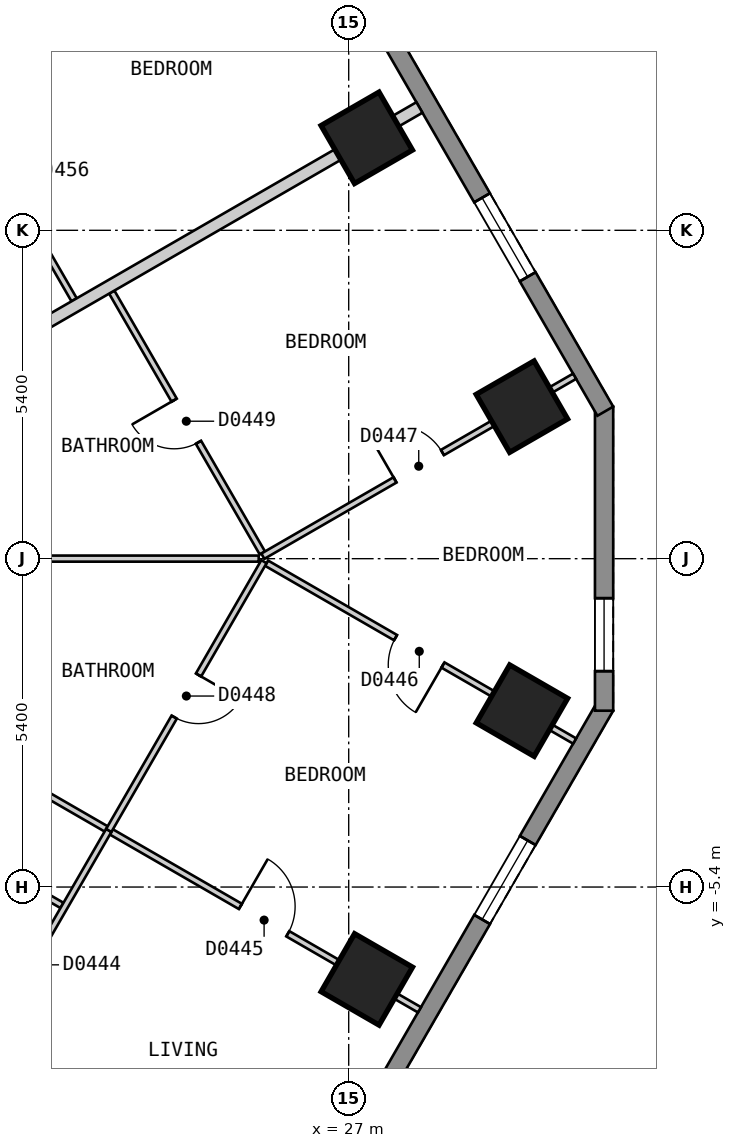
"""IFC4 building model, lengths in metres.
Left out: names, types, materials, properties, quantities, classifications, styles, units other than length and angle.
Written with IfcOpenShell. Run it as: python <this file> out.ifc"""

import sys

from ifc_helpers import new_model, si_unit, direction, frame, frame_2d, origin, origin_2d, place, context, subcontext, project, spatial, polyline, rectangle, outline, extrude, element, fill, save


model = new_model("IFC4")
c1 = context("Model", 3, precision=1e-05, world=origin(), true_north=direction((0.0, 1.0)))
c2 = subcontext(c1, "Body", "Model", "MODEL_VIEW")
j1 = project(units=[si_unit("LENGTHUNIT", "METRE"), si_unit("PLANEANGLEUNIT", "RADIAN")], contexts=[c1])
p1 = place(None, origin())
s1 = spatial("IfcSite", under=j1, at=p1, CompositionType="ELEMENT")
p2 = place(p1, origin())
s2 = spatial("IfcBuilding", under=s1, at=p2, CompositionType="ELEMENT")
p3 = place(p2, frame((0.0, 0.0, 38.4)))
s3 = spatial("IfcBuildingStorey", under=s2, at=p3, CompositionType="ELEMENT", Elevation=38.4)
for number, where, z_axis, x_axis in (
    (1, (27.298, -6.919, 0.0), (0.0, 0.0, 1.0), (0.5, 0.866, 0.0)),
    (2, (29.849, -2.499, 0.0), (0.0, 0.0, 1.0), (0.5, 0.866, 0.0)),
    (3, (29.848, 2.5, 0.0), (0.0, 0.0, 1.0), (-0.5, 0.866, 0.0)),
    (4, (27.297, 6.921, 0.0), (0.0, 0.0, 1.0), (-0.5, 0.866, 0.0)),
):
    element("IfcColumn", number, at=place(p3, frame(where, z_axis=z_axis, x_axis=x_axis)), inside=s3, PredefinedType="COLUMN", context=c2, shape_type="SweptSolid", body=[
        extrude(rectangle(XDim=1.1, YDim=1.1, at=origin_2d()), origin(), (0.0, 0.0, 1.0), 3.0),
    ])
p4 = place(p3, frame((17.71, -25.825, 0.0), z_axis=(0.0, 0.0, 1.0), x_axis=(0.500001938803, 0.866024284413, 0.0)))
e5 = element("IfcWall", 5, at=p4, inside=s3, PredefinedType="SOLIDWALL", context=c2, shape_type="SweptSolid", body=[
    extrude(outline(polyline([(0.0, -0.15), (27.02, -0.15), (26.94, 0.15), (0.08, 0.15), (0.0, -0.15)])), origin(), (0.0, 0.0, 1.0), 2.7),
])
p5 = place(p4, frame((2.553, 0.0, 0.15)))
e6 = element("IfcOpeningElement", 6, at=p5, cuts=e5, PredefinedType="OPENING", context=c2, shape_type="SweptSolid", body=[
    extrude(rectangle(XDim=1.5, YDim=2.1, at=frame_2d((0.75, 1.05))), frame((0.0, 0.16, 0.0), z_axis=(0.0, -1.0, 0.0), x_axis=(1.0, 0.0, 0.0)), (0.0, 0.0, 1.0), 0.32),
])
p6 = place(p4, frame((7.658, 0.0, 0.15)))
e7 = element("IfcOpeningElement", 7, at=p6, cuts=e5, PredefinedType="OPENING", context=c2, shape_type="SweptSolid", body=[
    extrude(rectangle(XDim=1.5, YDim=2.1, at=frame_2d((0.75, 1.05))), frame((0.0, 0.16, 0.0), z_axis=(0.0, -1.0, 0.0), x_axis=(1.0, 0.0, 0.0)), (0.0, 0.0, 1.0), 0.32),
])
p7 = place(p4, frame((12.761, 0.0, 0.15)))
e8 = element("IfcOpeningElement", 8, at=p7, cuts=e5, PredefinedType="OPENING", context=c2, shape_type="SweptSolid", body=[
    extrude(rectangle(XDim=1.5, YDim=2.1, at=frame_2d((0.75, 1.05))), frame((0.0, 0.16, 0.0), z_axis=(0.0, -1.0, 0.0), x_axis=(1.0, 0.0, 0.0)), (0.0, 0.0, 1.0), 0.32),
])
p8 = place(p4, frame((17.865, 0.0, 0.15)))
e9 = element("IfcOpeningElement", 9, at=p8, cuts=e5, PredefinedType="OPENING", context=c2, shape_type="SweptSolid", body=[
    extrude(rectangle(XDim=1.5, YDim=2.1, at=frame_2d((0.75, 1.05))), frame((0.0, 0.16, 0.0), z_axis=(0.0, -1.0, 0.0), x_axis=(1.0, 0.0, 0.0)), (0.0, 0.0, 1.0), 0.32),
])
p9 = place(p4, frame((22.969, 0.0, 0.15)))
e10 = element("IfcOpeningElement", 10, at=p9, cuts=e5, PredefinedType="OPENING", context=c2, shape_type="SweptSolid", body=[
    extrude(rectangle(XDim=1.5, YDim=2.1, at=frame_2d((0.75, 1.05))), frame((0.0, 0.16, 0.0), z_axis=(0.0, -1.0, 0.0), x_axis=(1.0, 0.0, 0.0)), (0.0, 0.0, 1.0), 0.32),
])
p10 = place(p3, frame((31.2, -2.5, 0.0), z_axis=(0.0, 0.0, 1.0), x_axis=(0.0, 1.0, 0.0)))
e11 = element("IfcWall", 11, at=p10, inside=s3, PredefinedType="SOLIDWALL", context=c2, shape_type="SweptSolid", body=[
    extrude(outline(polyline([(0.0, -0.15), (5.0, -0.15), (4.92, 0.15), (0.08, 0.15), (0.0, -0.15)])), origin(), (0.0, 0.0, 1.0), 2.7),
])
p11 = place(p10, frame((0.65, 0.0, 0.15)))
e12 = element("IfcOpeningElement", 12, at=p11, cuts=e11, PredefinedType="OPENING", context=c2, shape_type="SweptSolid", body=[
    extrude(rectangle(XDim=1.2, YDim=2.1, at=frame_2d((0.6, 1.05))), frame((0.0, 0.16, 0.0), z_axis=(0.0, -1.0, 0.0), x_axis=(1.0, 0.0, 0.0)), (0.0, 0.0, 1.0), 0.32),
])
p12 = place(p3, frame((31.22, 2.425, 0.0), z_axis=(0.0, 0.0, 1.0), x_axis=(-0.500001938803, 0.866024284413, 0.0)))
e13 = element("IfcWall", 13, at=p12, inside=s3, PredefinedType="SOLIDWALL", context=c2, shape_type="SweptSolid", body=[
    extrude(outline(polyline([(0.0, -0.15), (27.02, -0.15), (26.94, 0.15), (0.08, 0.15), (0.0, -0.15)])), origin(), (0.0, 0.0, 1.0), 2.7),
])
p13 = place(p12, frame((2.553, 0.0, 0.15)))
e14 = element("IfcOpeningElement", 14, at=p13, cuts=e13, PredefinedType="OPENING", context=c2, shape_type="SweptSolid", body=[
    extrude(rectangle(XDim=1.5, YDim=2.1, at=frame_2d((0.75, 1.05))), frame((0.0, 0.16, 0.0), z_axis=(0.0, -1.0, 0.0), x_axis=(1.0, 0.0, 0.0)), (0.0, 0.0, 1.0), 0.32),
])
p14 = place(p12, frame((7.657, 0.0, 0.15)))
e15 = element("IfcOpeningElement", 15, at=p14, cuts=e13, PredefinedType="OPENING", context=c2, shape_type="SweptSolid", body=[
    extrude(rectangle(XDim=1.5, YDim=2.1, at=frame_2d((0.75, 1.05))), frame((0.0, 0.16, 0.0), z_axis=(0.0, -1.0, 0.0), x_axis=(1.0, 0.0, 0.0)), (0.0, 0.0, 1.0), 0.32),
])
p15 = place(p12, frame((12.761, 0.0, 0.15)))
e16 = element("IfcOpeningElement", 16, at=p15, cuts=e13, PredefinedType="OPENING", context=c2, shape_type="SweptSolid", body=[
    extrude(rectangle(XDim=1.5, YDim=2.1, at=frame_2d((0.75, 1.05))), frame((0.0, 0.16, 0.0), z_axis=(0.0, -1.0, 0.0), x_axis=(1.0, 0.0, 0.0)), (0.0, 0.0, 1.0), 0.32),
])
p16 = place(p12, frame((17.865, 0.0, 0.15)))
e17 = element("IfcOpeningElement", 17, at=p16, cuts=e13, PredefinedType="OPENING", context=c2, shape_type="SweptSolid", body=[
    extrude(rectangle(XDim=1.5, YDim=2.1, at=frame_2d((0.75, 1.05))), frame((0.0, 0.16, 0.0), z_axis=(0.0, -1.0, 0.0), x_axis=(1.0, 0.0, 0.0)), (0.0, 0.0, 1.0), 0.32),
])
p17 = place(p12, frame((22.969, 0.0, 0.15)))
e18 = element("IfcOpeningElement", 18, at=p17, cuts=e13, PredefinedType="OPENING", context=c2, shape_type="SweptSolid", body=[
    extrude(rectangle(XDim=1.5, YDim=2.1, at=frame_2d((0.75, 1.05))), frame((0.0, 0.16, 0.0), z_axis=(0.0, -1.0, 0.0), x_axis=(1.0, 0.0, 0.0)), (0.0, 0.0, 1.0), 0.32),
])
p18 = place(p3, frame((20.006, 8.548, 0.0), z_axis=(0.0, 0.0, 1.0), x_axis=(0.500055121407, -0.865993577086, 0.0)))
e19 = element("IfcWall", 19, at=p18, inside=s3, PredefinedType="PARTITIONING", context=c2, shape_type="SweptSolid", body=[
    extrude(rectangle(XDim=4.955, YDim=0.1, at=frame_2d((2.478, 0.0))), origin(), (0.0, 0.0, 1.0), 2.7),
])
p19 = place(p18, frame((2.102, 0.0, 0.0)))
e20 = element("IfcOpeningElement", 20, at=p19, cuts=e19, PredefinedType="OPENING", context=c2, shape_type="SweptSolid", body=[
    extrude(rectangle(XDim=0.8, YDim=2.1, at=frame_2d((0.4, 1.05))), frame((0.0, 0.06, 0.0), z_axis=(0.0, -1.0, 0.0), x_axis=(1.0, 0.0, 0.0)), (0.0, 0.0, 1.0), 0.12),
])
p20 = place(p3, frame((23.103, 4.384, 0.0), z_axis=(0.0, 0.0, 1.0), x_axis=(0.500029609304, -0.86600830817, 0.0)))
e21 = element("IfcWall", 21, at=p20, inside=s3, PredefinedType="PARTITIONING", context=c2, shape_type="SweptSolid", body=[
    extrude(rectangle(XDim=4.954, YDim=0.1, at=frame_2d((2.477, 0.0))), origin(), (0.0, 0.0, 1.0), 2.7),
])
p21 = place(p20, frame((2.052, 0.0, 0.0)))
e22 = element("IfcOpeningElement", 22, at=p21, cuts=e21, PredefinedType="OPENING", context=c2, shape_type="SweptSolid", body=[
    extrude(rectangle(XDim=0.8, YDim=2.1, at=frame_2d((0.4, 1.05))), frame((0.0, 0.06, 0.0), z_axis=(0.0, -1.0, 0.0), x_axis=(1.0, 0.0, 0.0)), (0.0, 0.0, 1.0), 0.12),
])
p22 = place(p3, frame((18.777, -3.677, 0.0), z_axis=(0.0, 0.0, 1.0), x_axis=(0.866000843773, -0.500042536776, 0.0)))
e23 = element("IfcWall", 23, at=p22, inside=s3, PredefinedType="PARTITIONING", context=c2, shape_type="SweptSolid", body=[
    extrude(rectangle(XDim=4.05, YDim=0.1, at=frame_2d((2.025, 0.0))), origin(), (0.0, 0.0, 1.0), 2.7),
])
p23 = place(p22, frame((1.55, 0.0, 0.0)))
e24 = element("IfcOpeningElement", 24, at=p23, cuts=e23, PredefinedType="OPENING", context=c2, shape_type="SweptSolid", body=[
    extrude(rectangle(XDim=0.9, YDim=2.1, at=frame_2d((0.45, 1.05))), frame((0.0, 0.06, 0.0), z_axis=(0.0, -1.0, 0.0), x_axis=(1.0, 0.0, 0.0)), (0.0, 0.0, 1.0), 0.12),
])
p24 = place(p3, frame((19.503, -2.419, 0.0), z_axis=(0.0, 0.0, 1.0), x_axis=(0.866047370643, -0.499961950354, 0.0)))
e25 = element("IfcWall", 25, at=p24, inside=s3, PredefinedType="PARTITIONING", context=c2, shape_type="SweptSolid", body=[
    extrude(rectangle(XDim=10.001, YDim=0.1, at=frame_2d((5.0, 0.0))), origin(), (0.0, 0.0, 1.0), 2.7),
])
p25 = place(p24, frame((6.6, 0.0, 0.0)))
e26 = element("IfcOpeningElement", 26, at=p25, cuts=e25, PredefinedType="OPENING", context=c2, shape_type="SweptSolid", body=[
    extrude(rectangle(XDim=0.9, YDim=2.1, at=frame_2d((0.45, 1.05))), frame((0.0, 0.06, 0.0), z_axis=(0.0, -1.0, 0.0), x_axis=(1.0, 0.0, 0.0)), (0.0, 0.0, 1.0), 0.12),
])
p26 = place(p3, frame((25.649, -0.074, 0.0), z_axis=(0.0, 0.0, 1.0), x_axis=(0.866059819573, -0.499940385368, 0.0)))
e27 = element("IfcWall", 27, at=p26, inside=s3, PredefinedType="PARTITIONING", context=c2, shape_type="SweptSolid", body=[
    extrude(rectangle(XDim=5.851, YDim=0.1, at=frame_2d((2.925, 0.0))), origin(), (0.0, 0.0, 1.0), 2.7),
])
p27 = place(p26, frame((2.45, 0.0, 0.0)))
e28 = element("IfcOpeningElement", 28, at=p27, cuts=e27, PredefinedType="OPENING", context=c2, shape_type="SweptSolid", body=[
    extrude(rectangle(XDim=0.9, YDim=2.1, at=frame_2d((0.45, 1.05))), frame((0.0, 0.06, 0.0), z_axis=(0.0, -1.0, 0.0), x_axis=(1.0, 0.0, 0.0)), (0.0, 0.0, 1.0), 0.12),
])
p28 = place(p3, frame((20.784, 0.001, 0.0), z_axis=(0.0, 0.0, 1.0), x_axis=(1.0, 0.0, 0.0)))
e29 = element("IfcWall", 29, at=p28, inside=s3, PredefinedType="PARTITIONING", context=c2, shape_type="SweptSolid", body=[
    extrude(rectangle(XDim=4.736, YDim=0.1, at=frame_2d((2.368, 0.0))), origin(), (0.0, 0.0, 1.0), 2.7),
])
p29 = place(p3, frame((20.978, -8.065, 0.0), z_axis=(0.0, 0.0, 1.0), x_axis=(0.499965068118, 0.866045570776, 0.0)))
e30 = element("IfcWall", 30, at=p29, inside=s3, PredefinedType="PARTITIONING", context=c2, shape_type="SweptSolid", body=[
    extrude(rectangle(XDim=4.152, YDim=0.1, at=frame_2d((2.076, 0.0))), origin(), (0.0, 0.0, 1.0), 2.7),
])
p30 = place(p29, frame((1.15, 0.0, 0.0)))
e31 = element("IfcOpeningElement", 31, at=p30, cuts=e30, PredefinedType="OPENING", context=c2, shape_type="SweptSolid", body=[
    extrude(rectangle(XDim=0.9, YDim=2.1, at=frame_2d((0.45, 1.05))), frame((0.0, 0.06, 0.0), z_axis=(0.0, -1.0, 0.0), x_axis=(1.0, 0.0, 0.0)), (0.0, 0.0, 1.0), 0.12),
])
p31 = place(p3, frame((25.588, 0.041, 0.0), z_axis=(0.0, 0.0, 1.0), x_axis=(0.866113484451, 0.499847408768, 0.0)))
e32 = element("IfcWall", 32, at=p31, inside=s3, PredefinedType="PARTITIONING", context=c2, shape_type="SweptSolid", body=[
    extrude(rectangle(XDim=5.92, YDim=0.1, at=frame_2d((2.96, 0.0))), origin(), (0.0, 0.0, 1.0), 2.7),
])
p32 = place(p31, frame((2.51, 0.0, 0.0)))
e33 = element("IfcOpeningElement", 33, at=p32, cuts=e32, PredefinedType="OPENING", context=c2, shape_type="SweptSolid", body=[
    extrude(rectangle(XDim=0.9, YDim=2.1, at=frame_2d((0.45, 1.05))), frame((0.0, 0.06, 0.0), z_axis=(0.0, -1.0, 0.0), x_axis=(1.0, 0.0, 0.0)), (0.0, 0.0, 1.0), 0.12),
])
p33 = place(p3, frame((16.95, 6.841, 0.0), z_axis=(0.0, 0.0, 1.0), x_axis=(0.866022959057, 0.500004234368, 0.0)))
e34 = element("IfcWall", 34, at=p33, inside=s3, PredefinedType="PARTITIONING", context=c2, shape_type="SweptSolid", body=[
    extrude(rectangle(XDim=10.0, YDim=0.1, at=frame_2d((5.0, 0.0))), origin(), (0.0, 0.0, 1.0), 2.7),
])
p34 = place(p33, frame((4.795, 0.0, 0.0)))
e35 = element("IfcOpeningElement", 35, at=p34, cuts=e34, PredefinedType="OPENING", context=c2, shape_type="SweptSolid", body=[
    extrude(rectangle(XDim=0.9, YDim=2.1, at=frame_2d((0.45, 1.05))), frame((0.0, 0.06, 0.0), z_axis=(0.0, -1.0, 0.0), x_axis=(1.0, 0.0, 0.0)), (0.0, 0.0, 1.0), 0.12),
])
p35 = place(p3, frame((16.951, -6.839, 0.0), z_axis=(0.0, 0.0, 1.0), x_axis=(0.866022959057, -0.500004234368, 0.0)))
e36 = element("IfcWall", 36, at=p35, inside=s3, PredefinedType="PARTITIONING", context=c2, shape_type="SweptSolid", body=[
    extrude(rectangle(XDim=10.0, YDim=0.2, at=frame_2d((5.0, 0.0))), origin(), (0.0, 0.0, 1.0), 2.7),
])
p36 = place(p3, frame((19.503, 2.421, 0.0), z_axis=(0.0, 0.0, 1.0), x_axis=(0.866065245018, 0.499930986609, 0.0)))
e37 = element("IfcWall", 37, at=p36, inside=s3, PredefinedType="PARTITIONING", context=c2, shape_type="SweptSolid", body=[
    extrude(rectangle(XDim=10.0, YDim=0.2, at=frame_2d((5.0, 0.0))), origin(), (0.0, 0.0, 1.0), 2.7),
])
p37 = place(p3, frame((23.054, -4.469, 0.0), z_axis=(0.0, 0.0, 1.0), x_axis=(0.500023345639, 0.866011924754, 0.0)))
e38 = element("IfcWall", 38, at=p37, inside=s3, PredefinedType="PARTITIONING", context=c2, shape_type="SweptSolid", body=[
    extrude(rectangle(XDim=5.104, YDim=0.1, at=frame_2d((2.552, 0.0))), origin(), (0.0, 0.0, 1.0), 2.7),
])
p38 = place(p37, frame((2.152, 0.0, 0.0)))
e39 = element("IfcOpeningElement", 39, at=p38, cuts=e38, PredefinedType="OPENING", context=c2, shape_type="SweptSolid", body=[
    extrude(rectangle(XDim=0.8, YDim=2.1, at=frame_2d((0.4, 1.05))), frame((0.0, 0.06, 0.0), z_axis=(0.0, -1.0, 0.0), x_axis=(1.0, 0.0, 0.0)), (0.0, 0.0, 1.0), 0.12),
])
p39 = place(p9, origin())
e40 = element("IfcWindow", 40, at=p39, inside=s3, PartitioningType="SINGLE_PANEL", PredefinedType="WINDOW", context=c2, shape_type="SweptSolid", body=[
    extrude(rectangle(XDim=1.5, YDim=2.1, at=frame_2d((0.75, 1.05))), frame((0.0, 0.03, 0.0), z_axis=(0.0, -1.0, 0.0), x_axis=(1.0, 0.0, 0.0)), (0.0, 0.0, 1.0), 0.06),
])
fill(e10, e40)
p40 = place(p11, origin())
e41 = element("IfcWindow", 41, at=p40, inside=s3, PartitioningType="SINGLE_PANEL", PredefinedType="WINDOW", context=c2, shape_type="SweptSolid", body=[
    extrude(rectangle(XDim=1.2, YDim=2.1, at=frame_2d((0.6, 1.05))), frame((0.0, 0.03, 0.0), z_axis=(0.0, -1.0, 0.0), x_axis=(1.0, 0.0, 0.0)), (0.0, 0.0, 1.0), 0.06),
])
fill(e12, e41)
p41 = place(p13, origin())
e42 = element("IfcWindow", 42, at=p41, inside=s3, PartitioningType="SINGLE_PANEL", PredefinedType="WINDOW", context=c2, shape_type="SweptSolid", body=[
    extrude(rectangle(XDim=1.5, YDim=2.1, at=frame_2d((0.75, 1.05))), frame((0.0, 0.03, 0.0), z_axis=(0.0, -1.0, 0.0), x_axis=(1.0, 0.0, 0.0)), (0.0, 0.0, 1.0), 0.06),
])
fill(e14, e42)
p42 = place(p25, origin())
e43 = element("IfcDoor", 43, at=p42, inside=s3, OperationType="SINGLE_SWING_LEFT", PredefinedType="DOOR", context=c2, shape_type="SweptSolid", body=[
    extrude(rectangle(XDim=0.9, YDim=2.1, at=frame_2d((0.45, 1.05))), frame((0.0, 0.025, 0.0), z_axis=(0.0, -1.0, 0.0), x_axis=(1.0, 0.0, 0.0)), (0.0, 0.0, 1.0), 0.05),
])
fill(e26, e43)
p43 = place(p27, origin())
e44 = element("IfcDoor", 44, at=p43, inside=s3, OperationType="SINGLE_SWING_RIGHT", PredefinedType="DOOR", context=c2, shape_type="SweptSolid", body=[
    extrude(rectangle(XDim=0.9, YDim=2.1, at=frame_2d((0.45, 1.05))), frame((0.0, 0.025, 0.0), z_axis=(0.0, -1.0, 0.0), x_axis=(1.0, 0.0, 0.0)), (0.0, 0.0, 1.0), 0.05),
])
fill(e28, e44)
p44 = place(p32, origin())
e45 = element("IfcDoor", 45, at=p44, inside=s3, OperationType="SINGLE_SWING_LEFT", PredefinedType="DOOR", context=c2, shape_type="SweptSolid", body=[
    extrude(rectangle(XDim=0.9, YDim=2.1, at=frame_2d((0.45, 1.05))), frame((0.0, 0.025, 0.0), z_axis=(0.0, -1.0, 0.0), x_axis=(1.0, 0.0, 0.0)), (0.0, 0.0, 1.0), 0.05),
])
fill(e33, e45)
p45 = place(p38, origin())
e46 = element("IfcDoor", 46, at=p45, inside=s3, OperationType="SINGLE_SWING_RIGHT", PredefinedType="DOOR", context=c2, shape_type="SweptSolid", body=[
    extrude(rectangle(XDim=0.8, YDim=2.1, at=frame_2d((0.4, 1.05))), frame((0.0, 0.025, 0.0), z_axis=(0.0, -1.0, 0.0), x_axis=(1.0, 0.0, 0.0)), (0.0, 0.0, 1.0), 0.05),
])
fill(e39, e46)
p46 = place(p21, origin())
e47 = element("IfcDoor", 47, at=p46, inside=s3, OperationType="SINGLE_SWING_LEFT", PredefinedType="DOOR", context=c2, shape_type="SweptSolid", body=[
    extrude(rectangle(XDim=0.8, YDim=2.1, at=frame_2d((0.4, 1.05))), frame((0.0, 0.025, 0.0), z_axis=(0.0, -1.0, 0.0), x_axis=(1.0, 0.0, 0.0)), (0.0, 0.0, 1.0), 0.05),
])
fill(e22, e47)
save(model, sys.argv[1])
